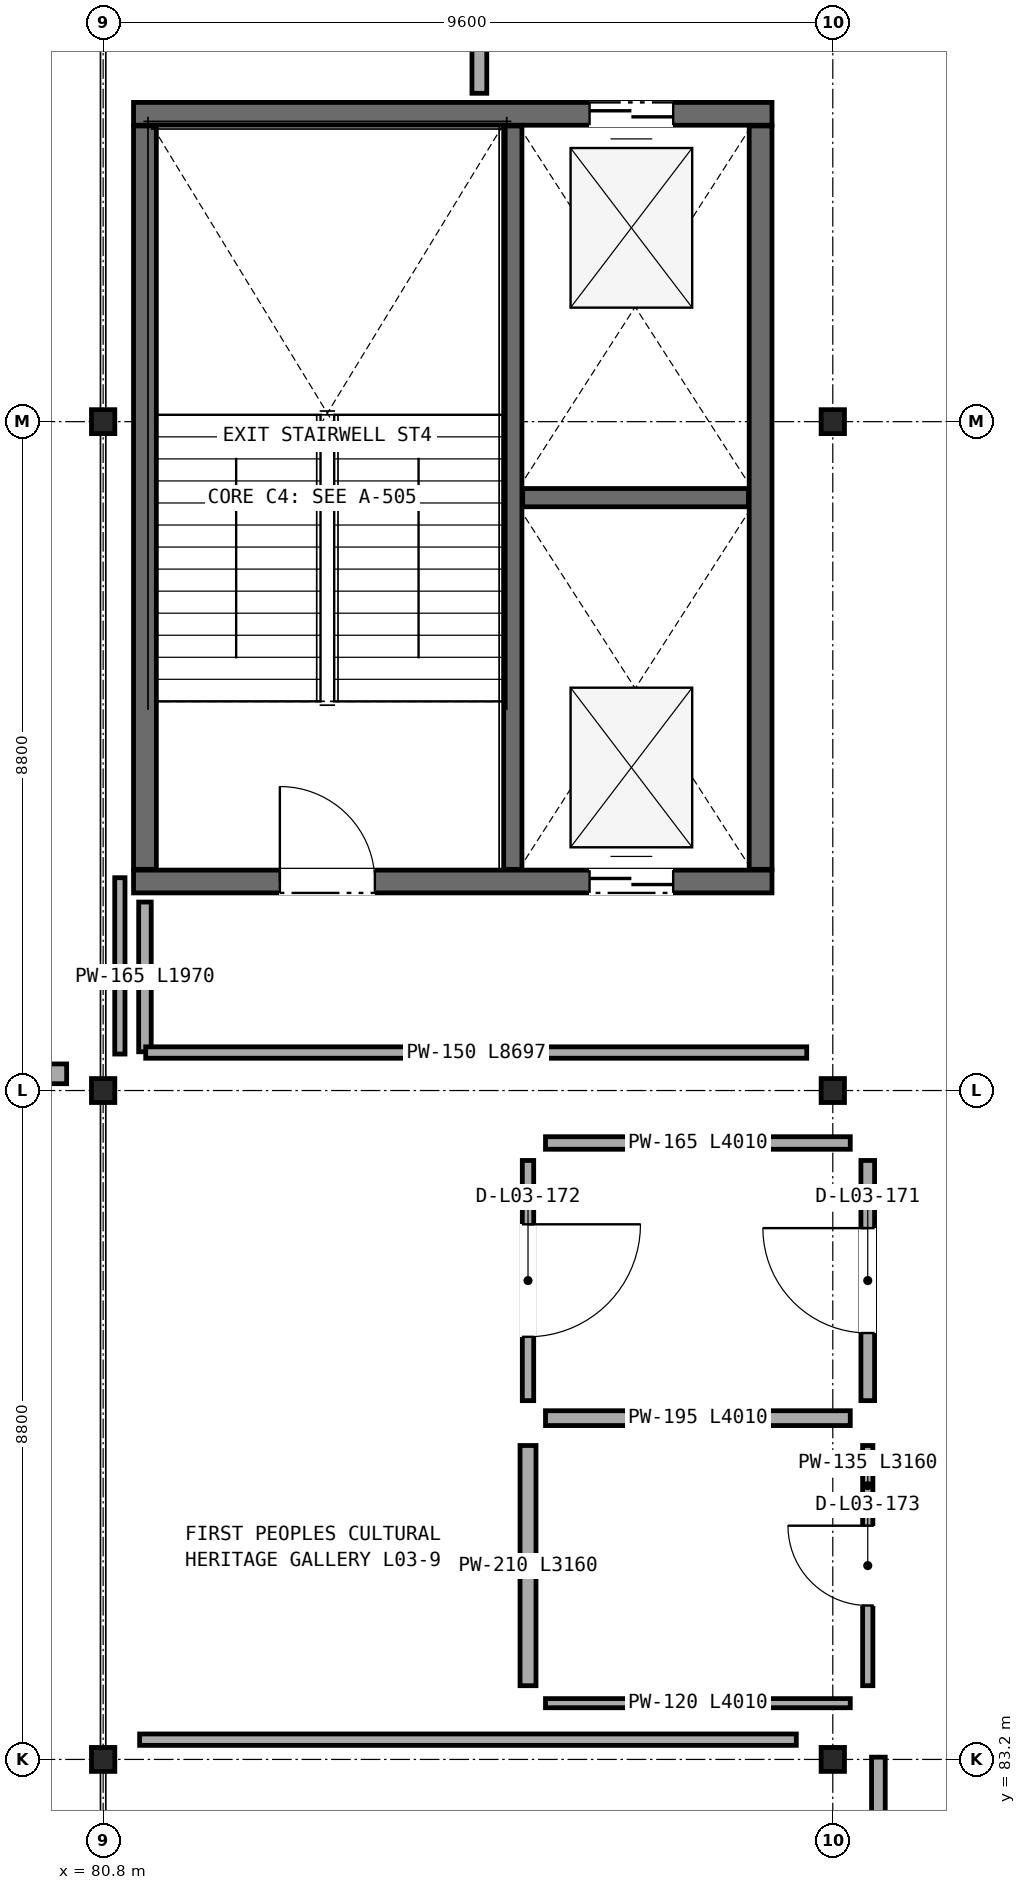
"""IFC4 building model, lengths in metres.
Left out: names, types, materials, properties, quantities, classifications, styles, units other than length and angle.
Written with IfcOpenShell. Run it as: python <this file> out.ifc"""

import sys

from ifc_helpers import new_model, si_unit, direction, frame, frame_2d, origin, origin_2d, place, context, subcontext, project, spatial, rectangle, i_section, extrude, element, fill, save


model = new_model("IFC4")
c1 = context("Model", 3, precision=1e-05, world=origin(), true_north=direction((0.0, 1.0)))
c2 = subcontext(c1, "Body", "Model", "MODEL_VIEW")
j1 = project(units=[si_unit("LENGTHUNIT", "METRE"), si_unit("PLANEANGLEUNIT", "RADIAN")], contexts=[c1])
p1 = place(None, origin())
s1 = spatial("IfcSite", under=j1, at=p1, CompositionType="ELEMENT")
p2 = place(p1, origin())
s2 = spatial("IfcBuilding", under=s1, at=p2, CompositionType="ELEMENT")
p3 = place(p2, frame((0.0, 0.0, 14.6)))
s3 = spatial("IfcBuildingStorey", under=s2, at=p3, CompositionType="ELEMENT", Elevation=14.6)
for number, where, z_axis, x_axis in (
    (1, (90.4, 83.2, 0.0), (0.0, 0.0, 1.0), (1.0, 0.0, 0.0)),
    (2, (90.4, 92.0, 0.0), (0.0, 0.0, 1.0), (1.0, 0.0, 0.0)),
    (3, (90.4, 100.8, 0.0), (0.0, 0.0, 1.0), (1.0, 0.0, 0.0)),
    (4, (80.8, 83.2, 0.0), (0.0, 0.0, 1.0), (1.0, 0.0, 0.0)),
    (5, (80.8, 92.0, 0.0), (0.0, 0.0, 1.0), (1.0, 0.0, 0.0)),
    (6, (80.8, 100.8, 0.0), (0.0, 0.0, 1.0), (1.0, 0.0, 0.0)),
):
    element("IfcColumn", number, at=place(p3, frame(where, z_axis=z_axis, x_axis=x_axis)), inside=s3, PredefinedType="COLUMN", context=c2, shape_type="SweptSolid", body=[
        extrude(i_section(OverallWidth=0.307, OverallDepth=0.315, WebThickness=0.012, FlangeThickness=0.019, FilletRadius=0.017, at=origin_2d()), origin(), (0.0, 0.0, 1.0), 4.5),
    ])
p4 = place(p3, frame((81.2, 94.75, 0.0), z_axis=(0.0, 0.0, 1.0), x_axis=(1.0, 0.0, 0.0)))
e7 = element("IfcWall", 7, at=p4, inside=s3, PredefinedType="SHEAR", context=c2, shape_type="SweptSolid", body=[
    extrude(rectangle(XDim=8.4, YDim=0.3, at=frame_2d((4.2, 0.0))), origin(), (0.0, 0.0, 1.0), 4.245),
])
p5 = place(p4, frame((1.925, 0.0, 0.0)))
e8 = element("IfcOpeningElement", 8, at=p5, cuts=e7, PredefinedType="OPENING", context=c2, shape_type="SweptSolid", body=[
    extrude(rectangle(XDim=1.25, YDim=2.2, at=frame_2d((0.625, 1.1))), frame((0.0, 0.16, 0.0), z_axis=(0.0, -1.0, 0.0), x_axis=(1.0, 0.0, 0.0)), (0.0, 0.0, 1.0), 0.32),
])
p6 = place(p4, frame((6.0, 0.0, 0.0)))
e9 = element("IfcOpeningElement", 9, at=p6, cuts=e7, PredefinedType="OPENING", context=c2, shape_type="SweptSolid", body=[
    extrude(rectangle(XDim=1.1, YDim=2.2, at=frame_2d((0.55, 1.1))), frame((0.0, 0.16, 0.0), z_axis=(0.0, -1.0, 0.0), x_axis=(1.0, 0.0, 0.0)), (0.0, 0.0, 1.0), 0.32),
])
p7 = place(p3, frame((89.6, 104.85, 0.0), z_axis=(0.0, 0.0, 1.0), x_axis=(-1.0, 0.0, 0.0)))
e10 = element("IfcWall", 10, at=p7, inside=s3, PredefinedType="SHEAR", context=c2, shape_type="SweptSolid", body=[
    extrude(rectangle(XDim=8.4, YDim=0.3, at=frame_2d((4.2, 0.0))), origin(), (0.0, 0.0, 1.0), 4.245),
])
p8 = place(p7, frame((1.3, 0.0, 0.0)))
e11 = element("IfcOpeningElement", 11, at=p8, cuts=e10, PredefinedType="OPENING", context=c2, shape_type="SweptSolid", body=[
    extrude(rectangle(XDim=1.1, YDim=2.2, at=frame_2d((0.55, 1.1))), frame((0.0, 0.16, 0.0), z_axis=(0.0, -1.0, 0.0), x_axis=(1.0, 0.0, 0.0)), (0.0, 0.0, 1.0), 0.32),
])
for number, where, z_axis, x_axis in (
    (12, (89.45, 94.91, 0.0), (0.0, 0.0, 1.0), (0.0, 1.0, 0.0)),
    (13, (81.35, 104.69, 0.0), (0.0, 0.0, 1.0), (0.0, -1.0, 0.0)),
):
    element("IfcWall", number, at=place(p3, frame(where, z_axis=z_axis, x_axis=x_axis)), inside=s3, PredefinedType="SHEAR", context=c2, shape_type="SweptSolid", body=[
        extrude(rectangle(XDim=9.78, YDim=0.3, at=frame_2d((4.89, 0.0))), origin(), (0.0, 0.0, 1.0), 4.245),
    ])
p9 = place(p3, frame((86.19, 94.91, 0.0), z_axis=(0.0, 0.0, 1.0), x_axis=(0.0, 1.0, 0.0)))
e14 = element("IfcWall", 14, at=p9, inside=s3, PredefinedType="SOLIDWALL", context=c2, shape_type="SweptSolid", body=[
    extrude(rectangle(XDim=9.78, YDim=0.24, at=frame_2d((4.89, 0.0))), origin(), (0.0, 0.0, 1.0), 4.245),
])
p10 = place(p3, frame((86.32, 99.8, 0.0), z_axis=(0.0, 0.0, 1.0), x_axis=(1.0, 0.0, 0.0)))
e15 = element("IfcWall", 15, at=p10, inside=s3, PredefinedType="SOLIDWALL", context=c2, shape_type="SweptSolid", body=[
    extrude(rectangle(XDim=2.97, YDim=0.24, at=frame_2d((1.485, 0.0))), origin(), (0.0, 0.0, 1.0), 4.245),
])
p11 = place(p3, frame((90.63, 87.69, 0.0), z_axis=(0.0, 0.0, 1.0), x_axis=(-1.0, 0.0, 0.0)))
e16 = element("IfcWall", 16, at=p11, inside=s3, PredefinedType="PARTITIONING", context=c2, shape_type="SweptSolid", body=[
    extrude(rectangle(XDim=4.01, YDim=0.195, at=frame_2d((2.005, 0.0))), origin(), (0.0, 0.0, 1.0), 3.763),
])
p12 = place(p3, frame((90.86, 91.08, 0.0), z_axis=(0.0, 0.0, 1.0), x_axis=(0.0, -1.0, 0.0)))
e17 = element("IfcWall", 17, at=p12, inside=s3, PredefinedType="PARTITIONING", context=c2, shape_type="SweptSolid", body=[
    extrude(rectangle(XDim=3.16, YDim=0.18, at=frame_2d((1.58, 0.0))), origin(), (0.0, 0.0, 1.0), 4.13),
])
p13 = place(p12, frame((0.89, 0.0, 0.0)))
e18 = element("IfcOpeningElement", 18, at=p13, cuts=e17, PredefinedType="OPENING", context=c2, shape_type="SweptSolid", body=[
    extrude(rectangle(XDim=1.38, YDim=2.24, at=frame_2d((0.69, 1.12))), frame((0.0, 0.1, 0.0), z_axis=(0.0, -1.0, 0.0), x_axis=(1.0, 0.0, 0.0)), (0.0, 0.0, 1.0), 0.2),
])
p14 = place(p3, frame((86.62, 91.31, 0.0), z_axis=(0.0, 0.0, 1.0), x_axis=(1.0, 0.0, 0.0)))
e19 = element("IfcWall", 19, at=p14, inside=s3, PredefinedType="PARTITIONING", context=c2, shape_type="SweptSolid", body=[
    extrude(rectangle(XDim=4.01, YDim=0.165, at=frame_2d((2.005, 0.0))), origin(), (0.0, 0.0, 1.0), 3.763),
])
p15 = place(p3, frame((86.39, 87.92, 0.0), z_axis=(0.0, 0.0, 1.0), x_axis=(0.0, 1.0, 0.0)))
e20 = element("IfcWall", 20, at=p15, inside=s3, PredefinedType="PARTITIONING", context=c2, shape_type="SweptSolid", body=[
    extrude(rectangle(XDim=3.16, YDim=0.15, at=frame_2d((1.58, 0.0))), origin(), (0.0, 0.0, 1.0), 4.13),
])
p16 = place(p15, frame((0.84, 0.0, 0.0)))
e21 = element("IfcOpeningElement", 21, at=p16, cuts=e20, PredefinedType="OPENING", context=c2, shape_type="SweptSolid", body=[
    extrude(rectangle(XDim=1.48, YDim=2.24, at=frame_2d((0.74, 1.12))), frame((0.0, 0.085, 0.0), z_axis=(0.0, -1.0, 0.0), x_axis=(1.0, 0.0, 0.0)), (0.0, 0.0, 1.0), 0.17),
])
p17 = place(p3, frame((90.86, 87.33, 0.0), z_axis=(0.0, 0.0, 1.0), x_axis=(0.0, -1.0, 0.0)))
e22 = element("IfcWall", 22, at=p17, inside=s3, PredefinedType="PARTITIONING", context=c2, shape_type="SweptSolid", body=[
    extrude(rectangle(XDim=3.16, YDim=0.135, at=frame_2d((1.58, 0.0))), origin(), (0.0, 0.0, 1.0), 4.13),
])
p18 = place(p17, frame((1.055, 0.0, 0.0)))
e23 = element("IfcOpeningElement", 23, at=p18, cuts=e22, PredefinedType="OPENING", context=c2, shape_type="SweptSolid", body=[
    extrude(rectangle(XDim=1.05, YDim=2.34, at=frame_2d((0.525, 1.17))), frame((0.0, 0.078, 0.0), z_axis=(0.0, -1.0, 0.0), x_axis=(1.0, 0.0, 0.0)), (0.0, 0.0, 1.0), 0.155),
])
p19 = place(p3, frame((90.63, 83.94, 0.0), z_axis=(0.0, 0.0, 1.0), x_axis=(-1.0, 0.0, 0.0)))
e24 = element("IfcWall", 24, at=p19, inside=s3, PredefinedType="PARTITIONING", context=c2, shape_type="SweptSolid", body=[
    extrude(rectangle(XDim=4.01, YDim=0.12, at=frame_2d((2.005, 0.0))), origin(), (0.0, 0.0, 1.0), 3.763),
])
p20 = place(p3, frame((86.39, 84.17, 0.0), z_axis=(0.0, 0.0, 1.0), x_axis=(0.0, 1.0, 0.0)))
e25 = element("IfcWall", 25, at=p20, inside=s3, PredefinedType="PARTITIONING", context=c2, shape_type="SweptSolid", body=[
    extrude(rectangle(XDim=3.16, YDim=0.21, at=frame_2d((1.58, 0.0))), origin(), (0.0, 0.0, 1.0), 4.13),
])
p21 = place(p3, frame((91.0, 83.23, 0.0), z_axis=(0.0, 0.0, 1.0), x_axis=(0.0, -1.0, 0.0)))
e26 = element("IfcWall", 26, at=p21, inside=s3, PredefinedType="PARTITIONING", context=c2, shape_type="SweptSolid", body=[
    extrude(rectangle(XDim=3.35, YDim=0.18, at=frame_2d((1.675, 0.0))), origin(), (0.0, 0.0, 1.0), 3.687),
])
p22 = place(p3, frame((81.35, 94.48, 0.0), z_axis=(0.0, 0.0, 1.0), x_axis=(0.0, -1.0, 0.0)))
e27 = element("IfcWall", 27, at=p22, inside=s3, PredefinedType="PARTITIONING", context=c2, shape_type="SweptSolid", body=[
    extrude(rectangle(XDim=1.97, YDim=0.165, at=frame_2d((0.985, 0.0))), origin(), (0.0, 0.0, 1.0), 4.13),
])
p23 = place(p3, frame((81.36, 92.5, 0.0), z_axis=(0.0, 0.0, 1.0), x_axis=(1.0, 0.0, 0.0)))
e28 = element("IfcWall", 28, at=p23, inside=s3, PredefinedType="PARTITIONING", context=c2, shape_type="SweptSolid", body=[
    extrude(rectangle(XDim=8.697, YDim=0.15, at=frame_2d((4.349, 0.0))), origin(), (0.0, 0.0, 1.0), 4.13),
])
p24 = place(p3, frame((81.02, 92.48, 0.0), z_axis=(0.0, 0.0, 1.0), x_axis=(0.0, 1.0, 0.0)))
e29 = element("IfcWall", 29, at=p24, inside=s3, PredefinedType="PARTITIONING", context=c2, shape_type="SweptSolid", body=[
    extrude(rectangle(XDim=2.32, YDim=0.135, at=frame_2d((1.16, 0.0))), origin(), (0.0, 0.0, 1.0), 3.723),
])
p25 = place(p3, frame((85.75, 107.64, 0.0), z_axis=(0.0, 0.0, 1.0), x_axis=(0.0, -1.0, 0.0)))
e30 = element("IfcWall", 30, at=p25, inside=s3, PredefinedType="PARTITIONING", context=c2, shape_type="SweptSolid", body=[
    extrude(rectangle(XDim=2.52, YDim=0.195, at=frame_2d((1.26, 0.0))), origin(), (0.0, 0.0, 1.0), 4.13),
])
p26 = place(p3, frame((81.28, 83.46, 0.0), z_axis=(0.0, 0.0, 1.0), x_axis=(1.0, 0.0, 0.0)))
e31 = element("IfcWall", 31, at=p26, inside=s3, PredefinedType="PARTITIONING", context=c2, shape_type="SweptSolid", body=[
    extrude(rectangle(XDim=8.64, YDim=0.15, at=frame_2d((4.32, 0.0))), origin(), (0.0, 0.0, 1.0), 3.687),
])
p27 = place(p3, frame((80.32, 92.22, 0.0), z_axis=(0.0, 0.0, 1.0), x_axis=(-1.0, 0.0, 0.0)))
e32 = element("IfcWall", 32, at=p27, inside=s3, PredefinedType="SOLIDWALL", context=c2, shape_type="SweptSolid", body=[
    extrude(rectangle(XDim=8.64, YDim=0.26, at=frame_2d((4.32, 0.0))), origin(), (0.0, 0.0, 1.0), 3.647),
])
p28 = place(p5, origin())
e33 = element("IfcDoor", 33, at=p28, inside=s3, OperationType="SINGLE_SWING_LEFT", PredefinedType="DOOR", context=c2, shape_type="SweptSolid", body=[
    extrude(rectangle(XDim=1.25, YDim=2.2, at=frame_2d((0.625, 1.1))), frame((0.0, 0.025, 0.0), z_axis=(0.0, -1.0, 0.0), x_axis=(1.0, 0.0, 0.0)), (0.0, 0.0, 1.0), 0.05),
])
fill(e8, e33)
p29 = place(p6, origin())
e34 = element("IfcDoor", 34, at=p29, inside=s3, OperationType="DOUBLE_DOOR_SLIDING", PredefinedType="DOOR", context=c2, shape_type="SweptSolid", body=[
    extrude(rectangle(XDim=1.1, YDim=2.2, at=frame_2d((0.55, 1.1))), frame((0.0, 0.025, 0.0), z_axis=(0.0, -1.0, 0.0), x_axis=(1.0, 0.0, 0.0)), (0.0, 0.0, 1.0), 0.05),
])
fill(e9, e34)
p30 = place(p8, origin())
e35 = element("IfcDoor", 35, at=p30, inside=s3, OperationType="DOUBLE_DOOR_SLIDING", PredefinedType="DOOR", context=c2, shape_type="SweptSolid", body=[
    extrude(rectangle(XDim=1.1, YDim=2.2, at=frame_2d((0.55, 1.1))), frame((0.0, 0.025, 0.0), z_axis=(0.0, -1.0, 0.0), x_axis=(1.0, 0.0, 0.0)), (0.0, 0.0, 1.0), 0.05),
])
fill(e11, e35)
p31 = place(p13, frame((1.38, 0.0, 0.0), z_axis=(0.0, 0.0, 1.0), x_axis=(-1.0, 0.0, 0.0)))
e36 = element("IfcDoor", 36, at=p31, inside=s3, OperationType="SINGLE_SWING_LEFT", PredefinedType="DOOR", context=c2, shape_type="SweptSolid", body=[
    extrude(rectangle(XDim=1.38, YDim=2.24, at=frame_2d((0.69, 1.12))), frame((0.0, 0.025, 0.0), z_axis=(0.0, -1.0, 0.0), x_axis=(1.0, 0.0, 0.0)), (0.0, 0.0, 1.0), 0.05),
])
fill(e18, e36)
p32 = place(p16, frame((1.48, 0.0, 0.0), z_axis=(0.0, 0.0, 1.0), x_axis=(-1.0, 0.0, 0.0)))
e37 = element("IfcDoor", 37, at=p32, inside=s3, OperationType="SINGLE_SWING_RIGHT", PredefinedType="DOOR", context=c2, shape_type="SweptSolid", body=[
    extrude(rectangle(XDim=1.48, YDim=2.24, at=frame_2d((0.74, 1.12))), frame((0.0, 0.025, 0.0), z_axis=(0.0, -1.0, 0.0), x_axis=(1.0, 0.0, 0.0)), (0.0, 0.0, 1.0), 0.05),
])
fill(e21, e37)
p33 = place(p18, frame((1.05, 0.0, 0.0), z_axis=(0.0, 0.0, 1.0), x_axis=(-1.0, 0.0, 0.0)))
e38 = element("IfcDoor", 38, at=p33, inside=s3, OperationType="SINGLE_SWING_LEFT", PredefinedType="DOOR", context=c2, shape_type="SweptSolid", body=[
    extrude(rectangle(XDim=1.05, YDim=2.34, at=frame_2d((0.525, 1.17))), frame((0.0, 0.025, 0.0), z_axis=(0.0, -1.0, 0.0), x_axis=(1.0, 0.0, 0.0)), (0.0, 0.0, 1.0), 0.05),
])
fill(e23, e38)
save(model, sys.argv[1])
